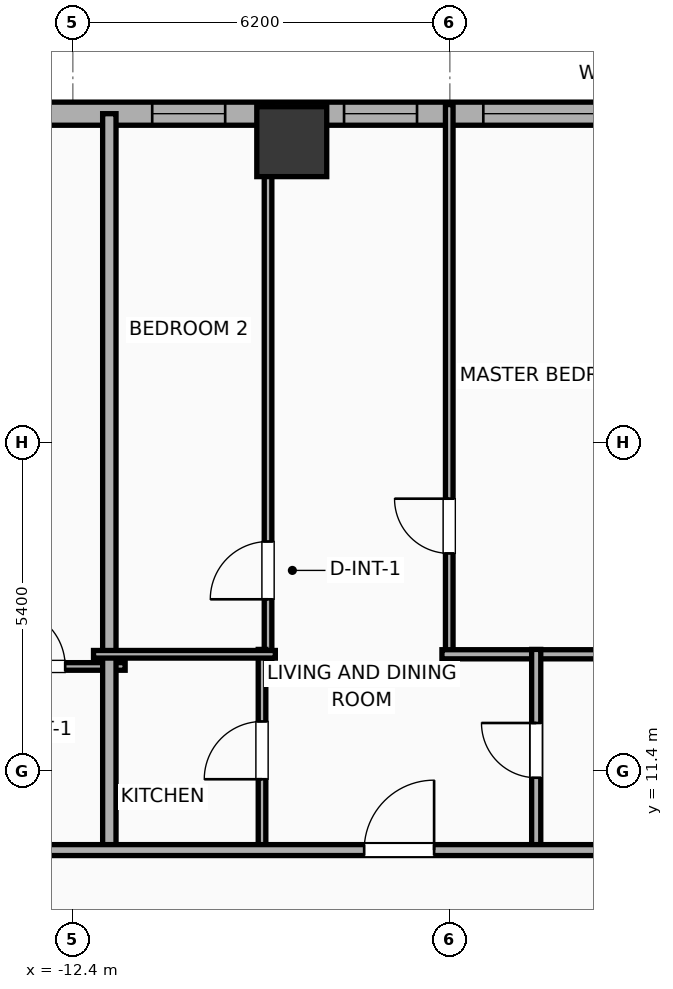
"""IFC4 building model, lengths in metres.
Left out: names, types, materials, properties, quantities, classifications, styles, units other than length and angle.
Written with IfcOpenShell. Run it as: python <this file> out.ifc"""

import sys

from ifc_helpers import new_model, si_unit, direction, frame, frame_2d, origin, origin_2d, place, context, subcontext, project, spatial, rectangle, hollow_rectangle, extrude, element, fill, save


model = new_model("IFC4")
c1 = context("Model", 3, precision=1e-05, world=origin(), true_north=direction((0.0, 1.0)))
c2 = subcontext(c1, "Body", "Model", "MODEL_VIEW")
j1 = project(units=[si_unit("LENGTHUNIT", "METRE"), si_unit("PLANEANGLEUNIT", "RADIAN")], contexts=[c1])
p1 = place(None, origin())
s1 = spatial("IfcSite", under=j1, at=p1, CompositionType="ELEMENT")
p2 = place(p1, origin())
s2 = spatial("IfcBuilding", under=s1, at=p2, CompositionType="ELEMENT")
p3 = place(p2, frame((0.0, 0.0, 33.8)))
s3 = spatial("IfcBuildingStorey", under=s2, at=p3, CompositionType="ELEMENT", Elevation=33.8)
p4 = place(p3, frame((-8.8, 21.75, 0.0), z_axis=(0.0, 0.0, 1.0), x_axis=(1.0, 0.0, 0.0)))
e1 = element("IfcColumn", 1, at=p4, inside=s3, PredefinedType="COLUMN", context=c2, shape_type="SweptSolid", body=[
    extrude(hollow_rectangle(XDim=1.15, YDim=1.15, WallThickness=0.04, at=origin_2d()), origin(), (0.0, 0.0, 1.0), 3.9),
])
p5 = place(p3, frame((-29.581, 22.21, 0.0), z_axis=(0.0, 0.0, 1.0), x_axis=(1.0, 0.0, 0.0)))
e2 = element("IfcWall", 2, at=p5, inside=s3, PredefinedType="ELEMENTEDWALL", context=c2, shape_type="SweptSolid", body=[
    extrude(rectangle(XDim=51.963, YDim=0.38, at=frame_2d((25.981, 0.0))), origin(), (0.0, 0.0, 1.0), 3.65),
])
p6 = place(p5, frame((5.81, 0.0, 0.75)))
e3 = element("IfcOpeningElement", 3, at=p6, cuts=e2, PredefinedType="OPENING", context=c2, shape_type="SweptSolid", body=[
    extrude(rectangle(XDim=2.4, YDim=2.1, at=frame_2d((1.2, 1.05))), frame((0.0, 0.2, 0.0), z_axis=(0.0, -1.0, 0.0), x_axis=(1.0, 0.0, 0.0)), (0.0, 0.0, 1.0), 0.4),
])
p7 = place(p5, frame((23.931, 0.0, 0.75)))
e4 = element("IfcOpeningElement", 4, at=p7, cuts=e2, PredefinedType="OPENING", context=c2, shape_type="SweptSolid", body=[
    extrude(rectangle(XDim=2.4, YDim=2.1, at=frame_2d((1.2, 1.05))), frame((0.0, 0.2, 0.0), z_axis=(0.0, -1.0, 0.0), x_axis=(1.0, 0.0, 0.0)), (0.0, 0.0, 1.0), 0.4),
])
p8 = place(p5, frame((3.056, 0.0, 0.75)))
e5 = element("IfcOpeningElement", 5, at=p8, cuts=e2, PredefinedType="OPENING", context=c2, shape_type="SweptSolid", body=[
    extrude(rectangle(XDim=1.2, YDim=2.05, at=frame_2d((0.6, 1.025))), frame((0.0, 0.2, 0.0), z_axis=(0.0, -1.0, 0.0), x_axis=(1.0, 0.0, 0.0)), (0.0, 0.0, 1.0), 0.4),
])
p9 = place(p5, frame((11.127, 0.0, 0.75)))
e6 = element("IfcOpeningElement", 6, at=p9, cuts=e2, PredefinedType="OPENING", context=c2, shape_type="SweptSolid", body=[
    extrude(rectangle(XDim=0.52, YDim=2.05, at=frame_2d((0.26, 1.025))), frame((0.0, 0.2, 0.0), z_axis=(0.0, -1.0, 0.0), x_axis=(1.0, 0.0, 0.0)), (0.0, 0.0, 1.0), 0.4),
])
p10 = place(p5, frame((14.327, 0.0, 0.75)))
e7 = element("IfcOpeningElement", 7, at=p10, cuts=e2, PredefinedType="OPENING", context=c2, shape_type="SweptSolid", body=[
    extrude(rectangle(XDim=1.2, YDim=2.05, at=frame_2d((0.6, 1.025))), frame((0.0, 0.2, 0.0), z_axis=(0.0, -1.0, 0.0), x_axis=(1.0, 0.0, 0.0)), (0.0, 0.0, 1.0), 0.4),
])
p11 = place(p5, frame((21.641, 0.0, 0.75)))
e8 = element("IfcOpeningElement", 8, at=p11, cuts=e2, PredefinedType="OPENING", context=c2, shape_type="SweptSolid", body=[
    extrude(rectangle(XDim=1.2, YDim=2.05, at=frame_2d((0.6, 1.025))), frame((0.0, 0.2, 0.0), z_axis=(0.0, -1.0, 0.0), x_axis=(1.0, 0.0, 0.0)), (0.0, 0.0, 1.0), 0.4),
])
p12 = place(p5, frame((18.486, 0.0, 0.75)))
e9 = element("IfcOpeningElement", 9, at=p12, cuts=e2, PredefinedType="OPENING", context=c2, shape_type="SweptSolid", body=[
    extrude(rectangle(XDim=1.2, YDim=2.05, at=frame_2d((0.6, 1.025))), frame((0.0, 0.2, 0.0), z_axis=(0.0, -1.0, 0.0), x_axis=(1.0, 0.0, 0.0)), (0.0, 0.0, 1.0), 0.4),
])
p13 = place(p5, frame((28.976, 0.0, 0.75)))
e10 = element("IfcOpeningElement", 10, at=p13, cuts=e2, PredefinedType="OPENING", context=c2, shape_type="SweptSolid", body=[
    extrude(rectangle(XDim=1.2, YDim=2.05, at=frame_2d((0.6, 1.025))), frame((0.0, 0.2, 0.0), z_axis=(0.0, -1.0, 0.0), x_axis=(1.0, 0.0, 0.0)), (0.0, 0.0, 1.0), 0.4),
])
p14 = place(p5, frame((33.476, 0.0, 0.75)))
e11 = element("IfcOpeningElement", 11, at=p14, cuts=e2, PredefinedType="OPENING", context=c2, shape_type="SweptSolid", body=[
    extrude(rectangle(XDim=1.2, YDim=2.05, at=frame_2d((0.6, 1.025))), frame((0.0, 0.2, 0.0), z_axis=(0.0, -1.0, 0.0), x_axis=(1.0, 0.0, 0.0)), (0.0, 0.0, 1.0), 0.4),
])
p15 = place(p5, frame((36.752, 0.0, 0.75)))
e12 = element("IfcOpeningElement", 12, at=p15, cuts=e2, PredefinedType="OPENING", context=c2, shape_type="SweptSolid", body=[
    extrude(rectangle(XDim=1.2, YDim=2.05, at=frame_2d((0.6, 1.025))), frame((0.0, 0.2, 0.0), z_axis=(0.0, -1.0, 0.0), x_axis=(1.0, 0.0, 0.0)), (0.0, 0.0, 1.0), 0.4),
])
p16 = place(p5, frame((42.452, 0.0, 0.75)))
e13 = element("IfcOpeningElement", 13, at=p16, cuts=e2, PredefinedType="OPENING", context=c2, shape_type="SweptSolid", body=[
    extrude(rectangle(XDim=1.2, YDim=2.05, at=frame_2d((0.6, 1.025))), frame((0.0, 0.2, 0.0), z_axis=(0.0, -1.0, 0.0), x_axis=(1.0, 0.0, 0.0)), (0.0, 0.0, 1.0), 0.4),
])
p17 = place(p5, frame((45.831, 0.0, 0.75)))
e14 = element("IfcOpeningElement", 14, at=p17, cuts=e2, PredefinedType="OPENING", context=c2, shape_type="SweptSolid", body=[
    extrude(rectangle(XDim=1.2, YDim=2.05, at=frame_2d((0.6, 1.025))), frame((0.0, 0.2, 0.0), z_axis=(0.0, -1.0, 0.0), x_axis=(1.0, 0.0, 0.0)), (0.0, 0.0, 1.0), 0.4),
])
p18 = place(p5, frame((48.585, 0.0, 0.75)))
e15 = element("IfcOpeningElement", 15, at=p18, cuts=e2, PredefinedType="OPENING", context=c2, shape_type="SweptSolid", body=[
    extrude(rectangle(XDim=1.2, YDim=2.05, at=frame_2d((0.6, 1.025))), frame((0.0, 0.2, 0.0), z_axis=(0.0, -1.0, 0.0), x_axis=(1.0, 0.0, 0.0)), (0.0, 0.0, 1.0), 0.4),
])
p19 = place(p5, frame((50.421, 0.0, 0.75)))
e16 = element("IfcOpeningElement", 16, at=p19, cuts=e2, PredefinedType="OPENING", context=c2, shape_type="SweptSolid", body=[
    extrude(rectangle(XDim=0.52, YDim=2.05, at=frame_2d((0.26, 1.025))), frame((0.0, 0.2, 0.0), z_axis=(0.0, -1.0, 0.0), x_axis=(1.0, 0.0, 0.0)), (0.0, 0.0, 1.0), 0.4),
])
p20 = place(p3, frame((-14.462, 13.12, 0.0), z_axis=(0.0, 0.0, 1.0), x_axis=(1.0, 0.0, 0.0)))
e17 = element("IfcWall", 17, at=p20, inside=s3, PredefinedType="PARTITIONING", context=c2, shape_type="SweptSolid", body=[
    extrude(rectangle(XDim=2.922, YDim=0.125, at=frame_2d((1.461, 0.0))), origin(), (0.0, 0.0, 1.0), 3.65),
])
p21 = place(p20, frame((0.986, 0.0, 0.0)))
e18 = element("IfcOpeningElement", 18, at=p21, cuts=e17, PredefinedType="OPENING", context=c2, shape_type="SweptSolid", body=[
    extrude(rectangle(XDim=0.95, YDim=2.05, at=frame_2d((0.475, 1.025))), frame((0.0, 0.073, 0.0), z_axis=(0.0, -1.0, 0.0), x_axis=(1.0, 0.0, 0.0)), (0.0, 0.0, 1.0), 0.145),
])
p22 = place(p3, frame((-11.8, 10.02, 0.0), z_axis=(0.0, 0.0, 1.0), x_axis=(0.0, 1.0, 0.0)))
e19 = element("IfcWall", 19, at=p22, inside=s3, PredefinedType="PARTITIONING", context=c2, shape_type="SweptSolid", body=[
    extrude(rectangle(XDim=12.19, YDim=0.22, at=frame_2d((6.095, 0.0))), origin(), (0.0, 0.0, 1.0), 2.94),
])
p23 = place(p3, frame((-9.19, 13.24, 0.0), z_axis=(0.0, 0.0, 1.0), x_axis=(0.0, 1.0, 0.0)))
e20 = element("IfcWall", 20, at=p23, inside=s3, PredefinedType="PARTITIONING", context=c2, shape_type="SweptSolid", body=[
    extrude(rectangle(XDim=9.12, YDim=0.125, at=frame_2d((4.56, 0.0))), origin(), (0.0, 0.0, 1.0), 2.94),
])
p24 = place(p23, frame((0.984, 0.0, 0.0)))
e21 = element("IfcOpeningElement", 21, at=p24, cuts=e20, PredefinedType="OPENING", context=c2, shape_type="SweptSolid", body=[
    extrude(rectangle(XDim=0.95, YDim=2.05, at=frame_2d((0.475, 1.025))), frame((0.0, 0.073, 0.0), z_axis=(0.0, -1.0, 0.0), x_axis=(1.0, 0.0, 0.0)), (0.0, 0.0, 1.0), 0.145),
])
p25 = place(p3, frame((-6.21, 13.24, 0.0), z_axis=(0.0, 0.0, 1.0), x_axis=(0.0, 1.0, 0.0)))
e22 = element("IfcWall", 22, at=p25, inside=s3, PredefinedType="PARTITIONING", context=c2, shape_type="SweptSolid", body=[
    extrude(rectangle(XDim=9.12, YDim=0.125, at=frame_2d((4.56, 0.0))), origin(), (0.0, 0.0, 1.0), 3.65),
])
p26 = place(p25, frame((1.739, 0.0, 0.0)))
e23 = element("IfcOpeningElement", 23, at=p26, cuts=e22, PredefinedType="OPENING", context=c2, shape_type="SweptSolid", body=[
    extrude(rectangle(XDim=0.9, YDim=2.05, at=frame_2d((0.45, 1.025))), frame((0.0, 0.073, 0.0), z_axis=(0.0, -1.0, 0.0), x_axis=(1.0, 0.0, 0.0)), (0.0, 0.0, 1.0), 0.145),
])
p27 = place(p3, frame((-6.33, 13.32, 0.0), z_axis=(0.0, 0.0, 1.0), x_axis=(1.0, 0.0, 0.0)))
e24 = element("IfcWall", 24, at=p27, inside=s3, PredefinedType="PLUMBINGWALL", context=c2, shape_type="SweptSolid", body=[
    extrude(rectangle(XDim=3.605, YDim=0.15, at=frame_2d((1.802, 0.0))), origin(), (0.0, 0.0, 1.0), 3.65),
])
p28 = place(p3, frame((-9.289, 10.08, 0.0), z_axis=(0.0, 0.0, 1.0), x_axis=(0.0, 1.0, 0.0)))
e25 = element("IfcWall", 25, at=p28, inside=s3, PredefinedType="PARTITIONING", context=c2, shape_type="SweptSolid", body=[
    extrude(rectangle(XDim=3.32, YDim=0.125, at=frame_2d((1.66, 0.0))), origin(), (0.0, 0.0, 1.0), 3.65),
])
p29 = place(p28, frame((1.185, 0.0, 0.0)))
e26 = element("IfcOpeningElement", 26, at=p29, cuts=e25, PredefinedType="OPENING", context=c2, shape_type="SweptSolid", body=[
    extrude(rectangle(XDim=0.95, YDim=2.05, at=frame_2d((0.475, 1.025))), frame((0.0, 0.073, 0.0), z_axis=(0.0, -1.0, 0.0), x_axis=(1.0, 0.0, 0.0)), (0.0, 0.0, 1.0), 0.145),
])
p30 = place(p3, frame((-12.06, 13.32, 0.0), z_axis=(0.0, 0.0, 1.0), x_axis=(1.0, 0.0, 0.0)))
e27 = element("IfcWall", 27, at=p30, inside=s3, PredefinedType="PARTITIONING", context=c2, shape_type="SweptSolid", body=[
    extrude(rectangle(XDim=2.99, YDim=0.125, at=frame_2d((1.495, 0.0))), origin(), (0.0, 0.0, 1.0), 3.65),
])
p31 = place(p3, frame((-4.78, 10.08, 0.0), z_axis=(0.0, 0.0, 1.0), x_axis=(0.0, 1.0, 0.0)))
e28 = element("IfcWall", 28, at=p31, inside=s3, PredefinedType="PLUMBINGWALL", context=c2, shape_type="SweptSolid", body=[
    extrude(rectangle(XDim=3.32, YDim=0.15, at=frame_2d((1.66, 0.0))), origin(), (0.0, 0.0, 1.0), 3.65),
])
p32 = place(p31, frame((1.21, 0.0, 0.0)))
e29 = element("IfcOpeningElement", 29, at=p32, cuts=e28, PredefinedType="OPENING", context=c2, shape_type="SweptSolid", body=[
    extrude(rectangle(XDim=0.9, YDim=2.05, at=frame_2d((0.45, 1.025))), frame((0.0, 0.085, 0.0), z_axis=(0.0, -1.0, 0.0), x_axis=(1.0, 0.0, 0.0)), (0.0, 0.0, 1.0), 0.17),
])
p33 = place(p3, frame((-33.41, 10.1, 0.0), z_axis=(0.0, 0.0, 1.0), x_axis=(1.0, 0.0, 0.0)))
e30 = element("IfcWall", 30, at=p33, inside=s3, PredefinedType="PARTITIONING", context=c2, shape_type="SweptSolid", body=[
    extrude(rectangle(XDim=59.62, YDim=0.18, at=frame_2d((29.81, 0.0))), origin(), (0.0, 0.0, 1.0), 3.65),
])
p34 = place(p33, frame((2.793, 0.0, 0.0)))
e31 = element("IfcOpeningElement", 31, at=p34, cuts=e30, PredefinedType="OPENING", context=c2, shape_type="SweptSolid", body=[
    extrude(rectangle(XDim=0.9, YDim=2.05, at=frame_2d((0.45, 1.025))), frame((0.0, 0.1, 0.0), z_axis=(0.0, -1.0, 0.0), x_axis=(1.0, 0.0, 0.0)), (0.0, 0.0, 1.0), 0.2),
])
p35 = place(p33, frame((10.037, 0.0, 0.0)))
e32 = element("IfcOpeningElement", 32, at=p35, cuts=e30, PredefinedType="OPENING", context=c2, shape_type="SweptSolid", body=[
    extrude(rectangle(XDim=1.15, YDim=2.05, at=frame_2d((0.575, 1.025))), frame((0.0, 0.1, 0.0), z_axis=(0.0, -1.0, 0.0), x_axis=(1.0, 0.0, 0.0)), (0.0, 0.0, 1.0), 0.2),
])
p36 = place(p33, frame((16.882, 0.0, 0.0)))
e33 = element("IfcOpeningElement", 33, at=p36, cuts=e30, PredefinedType="OPENING", context=c2, shape_type="SweptSolid", body=[
    extrude(rectangle(XDim=1.15, YDim=2.05, at=frame_2d((0.575, 1.025))), frame((0.0, 0.1, 0.0), z_axis=(0.0, -1.0, 0.0), x_axis=(1.0, 0.0, 0.0)), (0.0, 0.0, 1.0), 0.2),
])
p37 = place(p33, frame((25.801, 0.0, 0.0)))
e34 = element("IfcOpeningElement", 34, at=p37, cuts=e30, PredefinedType="OPENING", context=c2, shape_type="SweptSolid", body=[
    extrude(rectangle(XDim=1.15, YDim=2.05, at=frame_2d((0.575, 1.025))), frame((0.0, 0.1, 0.0), z_axis=(0.0, -1.0, 0.0), x_axis=(1.0, 0.0, 0.0)), (0.0, 0.0, 1.0), 0.2),
])
p38 = place(p33, frame((34.72, 0.0, 0.0)))
e35 = element("IfcOpeningElement", 35, at=p38, cuts=e30, PredefinedType="OPENING", context=c2, shape_type="SweptSolid", body=[
    extrude(rectangle(XDim=1.15, YDim=2.05, at=frame_2d((0.575, 1.025))), frame((0.0, 0.1, 0.0), z_axis=(0.0, -1.0, 0.0), x_axis=(1.0, 0.0, 0.0)), (0.0, 0.0, 1.0), 0.2),
])
p39 = place(p33, frame((43.771, 0.0, 0.0)))
e36 = element("IfcOpeningElement", 36, at=p39, cuts=e30, PredefinedType="OPENING", context=c2, shape_type="SweptSolid", body=[
    extrude(rectangle(XDim=1.15, YDim=2.05, at=frame_2d((0.575, 1.025))), frame((0.0, 0.1, 0.0), z_axis=(0.0, -1.0, 0.0), x_axis=(1.0, 0.0, 0.0)), (0.0, 0.0, 1.0), 0.2),
])
p40 = place(p33, frame((49.715, 0.0, 0.0)))
e37 = element("IfcOpeningElement", 37, at=p40, cuts=e30, PredefinedType="OPENING", context=c2, shape_type="SweptSolid", body=[
    extrude(rectangle(XDim=1.15, YDim=2.05, at=frame_2d((0.575, 1.025))), frame((0.0, 0.1, 0.0), z_axis=(0.0, -1.0, 0.0), x_axis=(1.0, 0.0, 0.0)), (0.0, 0.0, 1.0), 0.2),
])
p41 = place(p33, frame((56.654, 0.0, 0.0)))
e38 = element("IfcOpeningElement", 38, at=p41, cuts=e30, PredefinedType="OPENING", context=c2, shape_type="SweptSolid", body=[
    extrude(rectangle(XDim=0.9, YDim=2.05, at=frame_2d((0.45, 1.025))), frame((0.0, 0.1, 0.0), z_axis=(0.0, -1.0, 0.0), x_axis=(1.0, 0.0, 0.0)), (0.0, 0.0, 1.0), 0.2),
])
p42 = place(p7, origin())
e39 = element("IfcWindow", 39, at=p42, inside=s3, PartitioningType="SINGLE_PANEL", PredefinedType="WINDOW", context=c2, shape_type="SweptSolid", body=[
    extrude(rectangle(XDim=2.4, YDim=2.1, at=frame_2d((1.2, 1.05))), frame((0.0, 0.03, 0.0), z_axis=(0.0, -1.0, 0.0), x_axis=(1.0, 0.0, 0.0)), (0.0, 0.0, 1.0), 0.06),
])
fill(e4, e39)
p43 = place(p11, origin())
e40 = element("IfcWindow", 40, at=p43, inside=s3, PartitioningType="SINGLE_PANEL", PredefinedType="WINDOW", context=c2, shape_type="SweptSolid", body=[
    extrude(rectangle(XDim=1.2, YDim=2.05, at=frame_2d((0.6, 1.025))), frame((0.0, 0.03, 0.0), z_axis=(0.0, -1.0, 0.0), x_axis=(1.0, 0.0, 0.0)), (0.0, 0.0, 1.0), 0.06),
])
fill(e8, e40)
p44 = place(p12, origin())
e41 = element("IfcWindow", 41, at=p44, inside=s3, PartitioningType="SINGLE_PANEL", PredefinedType="WINDOW", context=c2, shape_type="SweptSolid", body=[
    extrude(rectangle(XDim=1.2, YDim=2.05, at=frame_2d((0.6, 1.025))), frame((0.0, 0.03, 0.0), z_axis=(0.0, -1.0, 0.0), x_axis=(1.0, 0.0, 0.0)), (0.0, 0.0, 1.0), 0.06),
])
fill(e9, e41)
p45 = place(p21, origin())
e42 = element("IfcDoor", 42, at=p45, inside=s3, OperationType="SINGLE_SWING_LEFT", PredefinedType="DOOR", context=c2, shape_type="SweptSolid", body=[
    extrude(rectangle(XDim=0.95, YDim=2.05, at=frame_2d((0.475, 1.025))), frame((0.0, 0.025, 0.0), z_axis=(0.0, -1.0, 0.0), x_axis=(1.0, 0.0, 0.0)), (0.0, 0.0, 1.0), 0.05),
])
fill(e18, e42)
p46 = place(p24, origin())
e43 = element("IfcDoor", 43, at=p46, inside=s3, OperationType="SINGLE_SWING_LEFT", PredefinedType="DOOR", context=c2, shape_type="SweptSolid", body=[
    extrude(rectangle(XDim=0.95, YDim=2.05, at=frame_2d((0.475, 1.025))), frame((0.0, 0.025, 0.0), z_axis=(0.0, -1.0, 0.0), x_axis=(1.0, 0.0, 0.0)), (0.0, 0.0, 1.0), 0.05),
])
fill(e21, e43)
p47 = place(p26, origin())
e44 = element("IfcDoor", 44, at=p47, inside=s3, OperationType="SINGLE_SWING_RIGHT", PredefinedType="DOOR", context=c2, shape_type="SweptSolid", body=[
    extrude(rectangle(XDim=0.9, YDim=2.05, at=frame_2d((0.45, 1.025))), frame((0.0, 0.025, 0.0), z_axis=(0.0, -1.0, 0.0), x_axis=(1.0, 0.0, 0.0)), (0.0, 0.0, 1.0), 0.05),
])
fill(e23, e44)
p48 = place(p29, origin())
e45 = element("IfcDoor", 45, at=p48, inside=s3, OperationType="SINGLE_SWING_LEFT", PredefinedType="DOOR", context=c2, shape_type="SweptSolid", body=[
    extrude(rectangle(XDim=0.95, YDim=2.05, at=frame_2d((0.475, 1.025))), frame((0.0, 0.025, 0.0), z_axis=(0.0, -1.0, 0.0), x_axis=(1.0, 0.0, 0.0)), (0.0, 0.0, 1.0), 0.05),
])
fill(e26, e45)
p49 = place(p32, origin())
e46 = element("IfcDoor", 46, at=p49, inside=s3, OperationType="SINGLE_SWING_RIGHT", PredefinedType="DOOR", context=c2, shape_type="SweptSolid", body=[
    extrude(rectangle(XDim=0.9, YDim=2.05, at=frame_2d((0.45, 1.025))), frame((0.0, 0.025, 0.0), z_axis=(0.0, -1.0, 0.0), x_axis=(1.0, 0.0, 0.0)), (0.0, 0.0, 1.0), 0.05),
])
fill(e29, e46)
p50 = place(p37, origin())
e47 = element("IfcDoor", 47, at=p50, inside=s3, OperationType="SINGLE_SWING_RIGHT", PredefinedType="DOOR", context=c2, shape_type="SweptSolid", body=[
    extrude(rectangle(XDim=1.15, YDim=2.05, at=frame_2d((0.575, 1.025))), frame((0.0, 0.025, 0.0), z_axis=(0.0, -1.0, 0.0), x_axis=(1.0, 0.0, 0.0)), (0.0, 0.0, 1.0), 0.05),
])
fill(e34, e47)
save(model, sys.argv[1])
